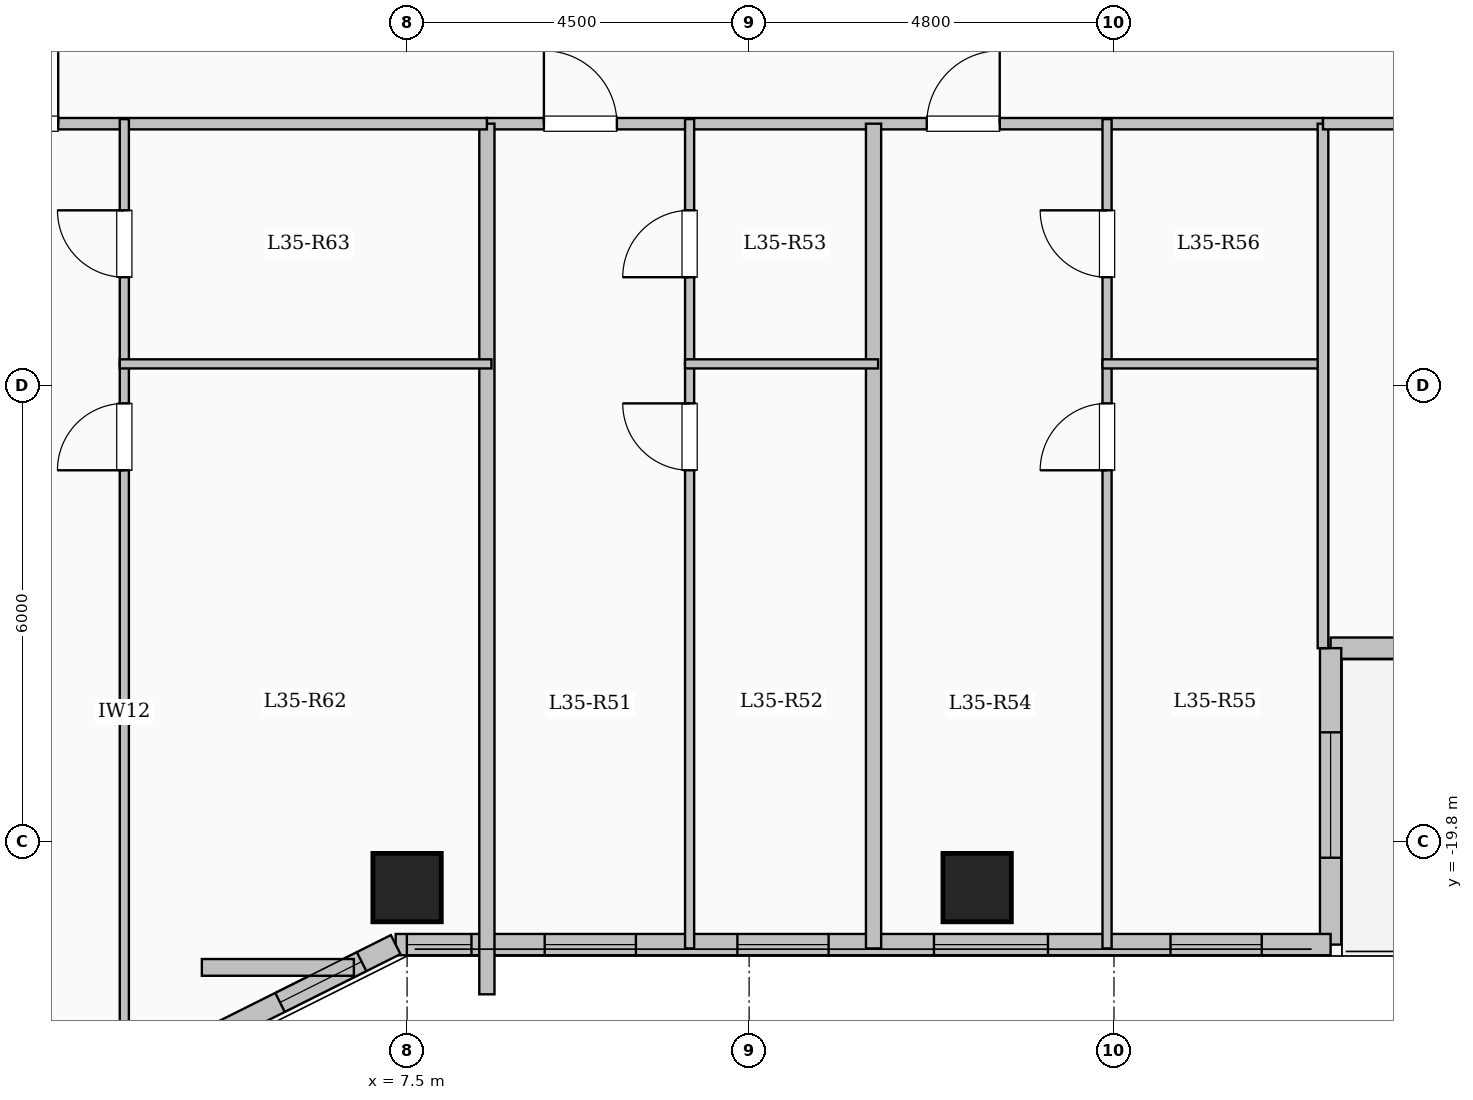
"""IFC4 building model, lengths in metres.
Left out: names, types, materials, properties, quantities, classifications, styles, units other than length and angle.
Written with IfcOpenShell. Run it as: python <this file> out.ifc"""

import sys

from ifc_helpers import new_model, si_unit, direction, frame, frame_2d, origin, origin_2d, place, context, subcontext, project, spatial, rectangle, extrude, element, fill, save


model = new_model("IFC4")
c1 = context("Model", 3, precision=1e-05, world=origin(), true_north=direction((0.0, 1.0)))
c2 = subcontext(c1, "Body", "Model", "MODEL_VIEW")
j1 = project(units=[si_unit("LENGTHUNIT", "METRE"), si_unit("PLANEANGLEUNIT", "RADIAN")], contexts=[c1])
p1 = place(None, origin())
s1 = spatial("IfcSite", under=j1, at=p1, CompositionType="ELEMENT")
p2 = place(p1, origin())
s2 = spatial("IfcBuilding", under=s1, at=p2, CompositionType="ELEMENT")
p3 = place(p2, frame((0.0, 0.0, 132.6)))
s3 = spatial("IfcBuildingStorey", under=s2, at=p3, CompositionType="ELEMENT", Elevation=132.6)
for number, where, z_axis, x_axis in (
    (1, (7.5, -20.4, 0.0), (0.0, 0.0, 1.0), (1.0, 0.0, 0.0)),
    (2, (15.0, -20.4, 0.0), (0.0, 0.0, 1.0), (1.0, 0.0, 0.0)),
):
    element("IfcColumn", number, at=place(p3, frame(where, z_axis=z_axis, x_axis=x_axis)), inside=s3, PredefinedType="COLUMN", context=c2, shape_type="SweptSolid", body=[
        extrude(rectangle(XDim=0.9, YDim=0.9, at=origin_2d()), origin(), (0.0, 0.0, 1.0), 3.35),
    ])
p4 = place(p3, frame((25.05, -17.25, 0.0), z_axis=(0.0, 0.0, 1.0), x_axis=(-1.0, 0.0, 0.0)))
e3 = element("IfcWall", 3, at=p4, inside=s3, PredefinedType="SOLIDWALL", context=c2, shape_type="SweptSolid", body=[
    extrude(rectangle(XDim=5.4, YDim=0.28, at=frame_2d((2.7, 0.0))), origin(), (0.0, 0.0, 1.0), 3.1),
])
p5 = place(p4, frame((2.25, 0.0, 0.0)))
e4 = element("IfcOpeningElement", 4, at=p5, cuts=e3, PredefinedType="OPENING", context=c2, shape_type="SweptSolid", body=[
    extrude(rectangle(XDim=1.1, YDim=2.2, at=frame_2d((0.55, 1.1))), frame((0.0, 0.15, 0.0), z_axis=(0.0, -1.0, 0.0), x_axis=(1.0, 0.0, 0.0)), (0.0, 0.0, 1.0), 0.3),
])
p6 = place(p4, frame((0.63, 0.0, 0.95)))
e5 = element("IfcOpeningElement", 5, at=p6, cuts=e3, PredefinedType="OPENING", context=c2, shape_type="SweptSolid", body=[
    extrude(rectangle(XDim=1.2, YDim=1.5, at=frame_2d((0.6, 0.75))), frame((0.0, 0.15, 0.0), z_axis=(0.0, -1.0, 0.0), x_axis=(1.0, 0.0, 0.0)), (0.0, 0.0, 1.0), 0.3),
])
p7 = place(p3, frame((19.65, -17.25, 0.0), z_axis=(0.0, 0.0, 1.0), x_axis=(0.0, -1.0, 0.0)))
e6 = element("IfcWall", 6, at=p7, inside=s3, PredefinedType="SOLIDWALL", context=c2, shape_type="SweptSolid", body=[
    extrude(rectangle(XDim=3.9, YDim=0.28, at=frame_2d((1.95, 0.0))), origin(), (0.0, 0.0, 1.0), 3.1),
])
p8 = place(p7, frame((1.107, 0.0, 0.9)))
e7 = element("IfcOpeningElement", 7, at=p8, cuts=e6, PredefinedType="OPENING", context=c2, shape_type="SweptSolid", body=[
    extrude(rectangle(XDim=1.65, YDim=1.6, at=frame_2d((0.825, 0.8))), frame((0.0, 0.15, 0.0), z_axis=(0.0, -1.0, 0.0), x_axis=(1.0, 0.0, 0.0)), (0.0, 0.0, 1.0), 0.3),
])
p9 = place(p3, frame((19.65, -21.15, 0.0), z_axis=(0.0, 0.0, 1.0), x_axis=(-1.0, 0.0, 0.0)))
e8 = element("IfcWall", 8, at=p9, inside=s3, PredefinedType="SOLIDWALL", context=c2, shape_type="SweptSolid", body=[
    extrude(rectangle(XDim=12.3, YDim=0.28, at=frame_2d((6.15, 0.0))), origin(), (0.0, 0.0, 1.0), 3.1),
])
p10 = place(p9, frame((0.906, 0.0, 0.95)))
e9 = element("IfcOpeningElement", 9, at=p10, cuts=e8, PredefinedType="OPENING", context=c2, shape_type="SweptSolid", body=[
    extrude(rectangle(XDim=1.2, YDim=1.5, at=frame_2d((0.6, 0.75))), frame((0.0, 0.15, 0.0), z_axis=(0.0, -1.0, 0.0), x_axis=(1.0, 0.0, 0.0)), (0.0, 0.0, 1.0), 0.3),
])
p11 = place(p9, frame((3.718, 0.0, 0.9)))
e10 = element("IfcOpeningElement", 10, at=p11, cuts=e8, PredefinedType="OPENING", context=c2, shape_type="SweptSolid", body=[
    extrude(rectangle(XDim=1.5, YDim=1.65, at=frame_2d((0.75, 0.825))), frame((0.0, 0.15, 0.0), z_axis=(0.0, -1.0, 0.0), x_axis=(1.0, 0.0, 0.0)), (0.0, 0.0, 1.0), 0.3),
])
p12 = place(p9, frame((6.604, 0.0, 0.95)))
e11 = element("IfcOpeningElement", 11, at=p12, cuts=e8, PredefinedType="OPENING", context=c2, shape_type="SweptSolid", body=[
    extrude(rectangle(XDim=1.2, YDim=1.5, at=frame_2d((0.6, 0.75))), frame((0.0, 0.15, 0.0), z_axis=(0.0, -1.0, 0.0), x_axis=(1.0, 0.0, 0.0)), (0.0, 0.0, 1.0), 0.3),
])
p13 = place(p9, frame((9.14, 0.0, 0.95)))
e12 = element("IfcOpeningElement", 12, at=p13, cuts=e8, PredefinedType="OPENING", context=c2, shape_type="SweptSolid", body=[
    extrude(rectangle(XDim=1.2, YDim=1.5, at=frame_2d((0.6, 0.75))), frame((0.0, 0.15, 0.0), z_axis=(0.0, -1.0, 0.0), x_axis=(1.0, 0.0, 0.0)), (0.0, 0.0, 1.0), 0.3),
])
p14 = place(p9, frame((11.303, 0.0, 0.95)))
e13 = element("IfcOpeningElement", 13, at=p14, cuts=e8, PredefinedType="OPENING", context=c2, shape_type="SweptSolid", body=[
    extrude(rectangle(XDim=0.85, YDim=1.5, at=frame_2d((0.425, 0.75))), frame((0.0, 0.15, 0.0), z_axis=(0.0, -1.0, 0.0), x_axis=(1.0, 0.0, 0.0)), (0.0, 0.0, 1.0), 0.3),
])
p15 = place(p3, frame((7.35, -21.15, 0.0), z_axis=(0.0, 0.0, 1.0), x_axis=(-0.894427191, -0.4472135955, 0.0)))
e14 = element("IfcWall", 14, at=p15, inside=s3, PredefinedType="SOLIDWALL", context=c2, shape_type="SweptSolid", body=[
    extrude(rectangle(XDim=3.354, YDim=0.28, at=frame_2d((1.677, 0.0))), origin(), (0.0, 0.0, 1.0), 3.1),
])
p16 = place(p15, frame((0.501, 0.0, 0.95)))
e15 = element("IfcOpeningElement", 15, at=p16, cuts=e14, PredefinedType="OPENING", context=c2, shape_type="SweptSolid", body=[
    extrude(rectangle(XDim=1.2, YDim=1.5, at=frame_2d((0.6, 0.75))), frame((0.0, 0.15, 0.0), z_axis=(0.0, -1.0, 0.0), x_axis=(1.0, 0.0, 0.0)), (0.0, 0.0, 1.0), 0.3),
])
p17 = place(p3, frame((4.8, -21.45, 0.0), z_axis=(0.0, 0.0, 1.0), x_axis=(1.0, 0.0, 0.0)))
e16 = element("IfcWall", 16, at=p17, inside=s3, PredefinedType="PARAPET", context=c2, shape_type="SweptSolid", body=[
    extrude(rectangle(XDim=2.0, YDim=0.22, at=frame_2d((1.0, 0.0))), origin(), (0.0, 0.0, 1.0), 0.85),
])
p18 = place(p3, frame((8.55, -10.35, 0.0), z_axis=(0.0, 0.0, 1.0), x_axis=(1.0, 0.0, 0.0)))
e17 = element("IfcWall", 17, at=p18, inside=s3, PredefinedType="PARTITIONING", context=c2, shape_type="SweptSolid", body=[
    extrude(rectangle(XDim=11.0, YDim=0.15, at=frame_2d((5.5, 0.0))), origin(), (0.0, 0.0, 1.0), 3.1),
])
p19 = place(p18, frame((0.75, 0.0, 0.0)))
e18 = element("IfcOpeningElement", 18, at=p19, cuts=e17, PredefinedType="OPENING", context=c2, shape_type="SweptSolid", body=[
    extrude(rectangle(XDim=0.96, YDim=2.15, at=frame_2d((0.48, 1.075))), frame((0.0, 0.085, 0.0), z_axis=(0.0, -1.0, 0.0), x_axis=(1.0, 0.0, 0.0)), (0.0, 0.0, 1.0), 0.17),
])
p20 = place(p18, frame((5.787, 0.0, 0.0)))
e19 = element("IfcOpeningElement", 19, at=p20, cuts=e17, PredefinedType="OPENING", context=c2, shape_type="SweptSolid", body=[
    extrude(rectangle(XDim=0.96, YDim=2.15, at=frame_2d((0.48, 1.075))), frame((0.0, 0.085, 0.0), z_axis=(0.0, -1.0, 0.0), x_axis=(1.0, 0.0, 0.0)), (0.0, 0.0, 1.0), 0.17),
])
p21 = place(p3, frame((13.637, -21.2, 0.0), z_axis=(0.0, 0.0, 1.0), x_axis=(0.0, 1.0, 0.0)))
e20 = element("IfcWall", 20, at=p21, inside=s3, PredefinedType="SOLIDWALL", context=c2, shape_type="SweptSolid", body=[
    extrude(rectangle(XDim=10.85, YDim=0.2, at=frame_2d((5.425, 0.0))), origin(), (0.0, 0.0, 1.0), 3.1),
])
p22 = place(p3, frame((11.217, -21.2, 0.0), z_axis=(0.0, 0.0, 1.0), x_axis=(0.0, 1.0, 0.0)))
e21 = element("IfcWall", 21, at=p22, inside=s3, PredefinedType="PARTITIONING", context=c2, shape_type="SweptSolid", body=[
    extrude(rectangle(XDim=7.69, YDim=0.12, at=frame_2d((3.845, 0.0))), origin(), (0.0, 0.0, 1.0), 3.1),
])
p23 = place(p22, frame((6.29, 0.0, 0.0)))
e22 = element("IfcOpeningElement", 22, at=p23, cuts=e21, PredefinedType="OPENING", context=c2, shape_type="SweptSolid", body=[
    extrude(rectangle(XDim=0.88, YDim=2.1, at=frame_2d((0.44, 1.05))), frame((0.0, 0.07, 0.0), z_axis=(0.0, -1.0, 0.0), x_axis=(1.0, 0.0, 0.0)), (0.0, 0.0, 1.0), 0.14),
])
p24 = place(p3, frame((11.217, -13.51, 0.0), z_axis=(0.0, 0.0, 1.0), x_axis=(0.0, 1.0, 0.0)))
e23 = element("IfcWall", 23, at=p24, inside=s3, PredefinedType="PARTITIONING", context=c2, shape_type="SweptSolid", body=[
    extrude(rectangle(XDim=3.22, YDim=0.12, at=frame_2d((1.61, 0.0))), origin(), (0.0, 0.0, 1.0), 3.1),
])
p25 = place(p24, frame((1.14, 0.0, 0.0)))
e24 = element("IfcOpeningElement", 24, at=p25, cuts=e23, PredefinedType="OPENING", context=c2, shape_type="SweptSolid", body=[
    extrude(rectangle(XDim=0.88, YDim=2.1, at=frame_2d((0.44, 1.05))), frame((0.0, 0.07, 0.0), z_axis=(0.0, -1.0, 0.0), x_axis=(1.0, 0.0, 0.0)), (0.0, 0.0, 1.0), 0.14),
])
p26 = place(p3, frame((11.157, -13.51, 0.0), z_axis=(0.0, 0.0, 1.0), x_axis=(1.0, 0.0, 0.0)))
e25 = element("IfcWall", 25, at=p26, inside=s3, PredefinedType="PARTITIONING", context=c2, shape_type="SweptSolid", body=[
    extrude(rectangle(XDim=2.54, YDim=0.12, at=frame_2d((1.27, 0.0))), origin(), (0.0, 0.0, 1.0), 3.1),
])
p27 = place(p3, frame((16.709, -21.2, 0.0), z_axis=(0.0, 0.0, 1.0), x_axis=(0.0, 1.0, 0.0)))
e26 = element("IfcWall", 26, at=p27, inside=s3, PredefinedType="PARTITIONING", context=c2, shape_type="SweptSolid", body=[
    extrude(rectangle(XDim=7.69, YDim=0.12, at=frame_2d((3.845, 0.0))), origin(), (0.0, 0.0, 1.0), 3.1),
])
p28 = place(p27, frame((6.29, 0.0, 0.0)))
e27 = element("IfcOpeningElement", 27, at=p28, cuts=e26, PredefinedType="OPENING", context=c2, shape_type="SweptSolid", body=[
    extrude(rectangle(XDim=0.88, YDim=2.1, at=frame_2d((0.44, 1.05))), frame((0.0, 0.07, 0.0), z_axis=(0.0, -1.0, 0.0), x_axis=(1.0, 0.0, 0.0)), (0.0, 0.0, 1.0), 0.14),
])
p29 = place(p3, frame((16.709, -13.51, 0.0), z_axis=(0.0, 0.0, 1.0), x_axis=(0.0, 1.0, 0.0)))
e28 = element("IfcWall", 28, at=p29, inside=s3, PredefinedType="PARTITIONING", context=c2, shape_type="SweptSolid", body=[
    extrude(rectangle(XDim=3.22, YDim=0.12, at=frame_2d((1.61, 0.0))), origin(), (0.0, 0.0, 1.0), 3.1),
])
p30 = place(p29, frame((1.14, 0.0, 0.0)))
e29 = element("IfcOpeningElement", 29, at=p30, cuts=e28, PredefinedType="OPENING", context=c2, shape_type="SweptSolid", body=[
    extrude(rectangle(XDim=0.88, YDim=2.1, at=frame_2d((0.44, 1.05))), frame((0.0, 0.07, 0.0), z_axis=(0.0, -1.0, 0.0), x_axis=(1.0, 0.0, 0.0)), (0.0, 0.0, 1.0), 0.14),
])
p31 = place(p3, frame((16.649, -13.51, 0.0), z_axis=(0.0, 0.0, 1.0), x_axis=(1.0, 0.0, 0.0)))
e30 = element("IfcWall", 30, at=p31, inside=s3, PredefinedType="PARTITIONING", context=c2, shape_type="SweptSolid", body=[
    extrude(rectangle(XDim=2.961, YDim=0.12, at=frame_2d((1.48, 0.0))), origin(), (0.0, 0.0, 1.0), 3.1),
])
p32 = place(p3, frame((8.55, -21.804, 0.0), z_axis=(0.0, 0.0, 1.0), x_axis=(0.0, 1.0, 0.0)))
e31 = element("IfcWall", 31, at=p32, inside=s3, PredefinedType="SOLIDWALL", context=c2, shape_type="SweptSolid", body=[
    extrude(rectangle(XDim=11.454, YDim=0.2, at=frame_2d((5.727, 0.0))), origin(), (0.0, 0.0, 1.0), 3.1),
])
p33 = place(p3, frame((-8.55, -10.35, 0.0), z_axis=(0.0, 0.0, 1.0), x_axis=(1.0, 0.0, 0.0)))
e32 = element("IfcWall", 32, at=p33, inside=s3, PredefinedType="PARTITIONING", context=c2, shape_type="SweptSolid", body=[
    extrude(rectangle(XDim=17.1, YDim=0.15, at=frame_2d((8.55, 0.0))), origin(), (0.0, 0.0, 1.0), 3.1),
])
p34 = place(p33, frame((1.15, 0.0, 0.0)))
e33 = element("IfcOpeningElement", 33, at=p34, cuts=e32, PredefinedType="OPENING", context=c2, shape_type="SweptSolid", body=[
    extrude(rectangle(XDim=0.96, YDim=2.15, at=frame_2d((0.48, 1.075))), frame((0.0, 0.085, 0.0), z_axis=(0.0, -1.0, 0.0), x_axis=(1.0, 0.0, 0.0)), (0.0, 0.0, 1.0), 0.17),
])
p35 = place(p33, frame((10.5, 0.0, 0.0)))
e34 = element("IfcOpeningElement", 34, at=p35, cuts=e32, PredefinedType="OPENING", context=c2, shape_type="SweptSolid", body=[
    extrude(rectangle(XDim=0.96, YDim=2.15, at=frame_2d((0.48, 1.075))), frame((0.0, 0.085, 0.0), z_axis=(0.0, -1.0, 0.0), x_axis=(1.0, 0.0, 0.0)), (0.0, 0.0, 1.0), 0.17),
])
p36 = place(p3, frame((3.78, -22.68, 0.0), z_axis=(0.0, 0.0, 1.0), x_axis=(0.0, 1.0, 0.0)))
e35 = element("IfcWall", 35, at=p36, inside=s3, PredefinedType="PARTITIONING", context=c2, shape_type="SweptSolid", body=[
    extrude(rectangle(XDim=9.17, YDim=0.12, at=frame_2d((4.585, 0.0))), origin(), (0.0, 0.0, 1.0), 3.1),
])
p37 = place(p36, frame((7.77, 0.0, 0.0)))
e36 = element("IfcOpeningElement", 36, at=p37, cuts=e35, PredefinedType="OPENING", context=c2, shape_type="SweptSolid", body=[
    extrude(rectangle(XDim=0.88, YDim=2.1, at=frame_2d((0.44, 1.05))), frame((0.0, 0.07, 0.0), z_axis=(0.0, -1.0, 0.0), x_axis=(1.0, 0.0, 0.0)), (0.0, 0.0, 1.0), 0.14),
])
p38 = place(p3, frame((3.78, -13.51, 0.0), z_axis=(0.0, 0.0, 1.0), x_axis=(0.0, 1.0, 0.0)))
e37 = element("IfcWall", 37, at=p38, inside=s3, PredefinedType="PARTITIONING", context=c2, shape_type="SweptSolid", body=[
    extrude(rectangle(XDim=3.22, YDim=0.12, at=frame_2d((1.61, 0.0))), origin(), (0.0, 0.0, 1.0), 3.1),
])
p39 = place(p38, frame((1.14, 0.0, 0.0)))
e38 = element("IfcOpeningElement", 38, at=p39, cuts=e37, PredefinedType="OPENING", context=c2, shape_type="SweptSolid", body=[
    extrude(rectangle(XDim=0.88, YDim=2.1, at=frame_2d((0.44, 1.05))), frame((0.0, 0.07, 0.0), z_axis=(0.0, -1.0, 0.0), x_axis=(1.0, 0.0, 0.0)), (0.0, 0.0, 1.0), 0.14),
])
p40 = place(p3, frame((3.72, -13.51, 0.0), z_axis=(0.0, 0.0, 1.0), x_axis=(1.0, 0.0, 0.0)))
e39 = element("IfcWall", 39, at=p40, inside=s3, PredefinedType="PARTITIONING", context=c2, shape_type="SweptSolid", body=[
    extrude(rectangle(XDim=4.89, YDim=0.12, at=frame_2d((2.445, 0.0))), origin(), (0.0, 0.0, 1.0), 3.1),
])
p41 = place(p3, frame((19.55, -17.25, 0.0), z_axis=(0.0, 0.0, 1.0), x_axis=(0.0, 1.0, 0.0)))
e40 = element("IfcWall", 40, at=p41, inside=s3, PredefinedType="PARTITIONING", context=c2, shape_type="SweptSolid", body=[
    extrude(rectangle(XDim=6.9, YDim=0.14, at=frame_2d((3.45, 0.0))), origin(), (0.0, 0.0, 1.0), 3.1),
])
p42 = place(p3, frame((19.55, -10.35, 0.0), z_axis=(0.0, 0.0, 1.0), x_axis=(1.0, 0.0, 0.0)))
e41 = element("IfcWall", 41, at=p42, inside=s3, PredefinedType="PARTITIONING", context=c2, shape_type="SweptSolid", body=[
    extrude(rectangle(XDim=5.53, YDim=0.15, at=frame_2d((2.765, 0.0))), origin(), (0.0, 0.0, 1.0), 3.1),
])
p43 = place(p42, frame((2.29, 0.0, 0.0)))
e42 = element("IfcOpeningElement", 42, at=p43, cuts=e41, PredefinedType="OPENING", context=c2, shape_type="SweptSolid", body=[
    extrude(rectangle(XDim=0.95, YDim=2.15, at=frame_2d((0.475, 1.075))), frame((0.0, 0.085, 0.0), z_axis=(0.0, -1.0, 0.0), x_axis=(1.0, 0.0, 0.0)), (0.0, 0.0, 1.0), 0.17),
])
p44 = place(p8, origin())
e43 = element("IfcWindow", 43, at=p44, inside=s3, PartitioningType="SINGLE_PANEL", PredefinedType="WINDOW", context=c2, shape_type="SweptSolid", body=[
    extrude(rectangle(XDim=1.65, YDim=1.6, at=frame_2d((0.825, 0.8))), frame((0.0, 0.03, 0.0), z_axis=(0.0, -1.0, 0.0), x_axis=(1.0, 0.0, 0.0)), (0.0, 0.0, 1.0), 0.06),
])
fill(e7, e43)
p45 = place(p10, origin())
e44 = element("IfcWindow", 44, at=p45, inside=s3, PartitioningType="SINGLE_PANEL", PredefinedType="WINDOW", context=c2, shape_type="SweptSolid", body=[
    extrude(rectangle(XDim=1.2, YDim=1.5, at=frame_2d((0.6, 0.75))), frame((0.0, 0.03, 0.0), z_axis=(0.0, -1.0, 0.0), x_axis=(1.0, 0.0, 0.0)), (0.0, 0.0, 1.0), 0.06),
])
fill(e9, e44)
p46 = place(p11, origin())
e45 = element("IfcWindow", 45, at=p46, inside=s3, PartitioningType="SINGLE_PANEL", PredefinedType="WINDOW", context=c2, shape_type="SweptSolid", body=[
    extrude(rectangle(XDim=1.5, YDim=1.65, at=frame_2d((0.75, 0.825))), frame((0.0, 0.03, 0.0), z_axis=(0.0, -1.0, 0.0), x_axis=(1.0, 0.0, 0.0)), (0.0, 0.0, 1.0), 0.06),
])
fill(e10, e45)
p47 = place(p12, origin())
e46 = element("IfcWindow", 46, at=p47, inside=s3, PartitioningType="SINGLE_PANEL", PredefinedType="WINDOW", context=c2, shape_type="SweptSolid", body=[
    extrude(rectangle(XDim=1.2, YDim=1.5, at=frame_2d((0.6, 0.75))), frame((0.0, 0.03, 0.0), z_axis=(0.0, -1.0, 0.0), x_axis=(1.0, 0.0, 0.0)), (0.0, 0.0, 1.0), 0.06),
])
fill(e11, e46)
p48 = place(p13, origin())
e47 = element("IfcWindow", 47, at=p48, inside=s3, PartitioningType="SINGLE_PANEL", PredefinedType="WINDOW", context=c2, shape_type="SweptSolid", body=[
    extrude(rectangle(XDim=1.2, YDim=1.5, at=frame_2d((0.6, 0.75))), frame((0.0, 0.03, 0.0), z_axis=(0.0, -1.0, 0.0), x_axis=(1.0, 0.0, 0.0)), (0.0, 0.0, 1.0), 0.06),
])
fill(e12, e47)
p49 = place(p14, origin())
e48 = element("IfcWindow", 48, at=p49, inside=s3, PartitioningType="SINGLE_PANEL", PredefinedType="WINDOW", context=c2, shape_type="SweptSolid", body=[
    extrude(rectangle(XDim=0.85, YDim=1.5, at=frame_2d((0.425, 0.75))), frame((0.0, 0.03, 0.0), z_axis=(0.0, -1.0, 0.0), x_axis=(1.0, 0.0, 0.0)), (0.0, 0.0, 1.0), 0.06),
])
fill(e13, e48)
p50 = place(p16, origin())
e49 = element("IfcWindow", 49, at=p50, inside=s3, PartitioningType="SINGLE_PANEL", PredefinedType="WINDOW", context=c2, shape_type="SweptSolid", body=[
    extrude(rectangle(XDim=1.2, YDim=1.5, at=frame_2d((0.6, 0.75))), frame((0.0, 0.03, 0.0), z_axis=(0.0, -1.0, 0.0), x_axis=(1.0, 0.0, 0.0)), (0.0, 0.0, 1.0), 0.06),
])
fill(e15, e49)
p51 = place(p19, origin())
e50 = element("IfcDoor", 50, at=p51, inside=s3, OperationType="SINGLE_SWING_LEFT", PredefinedType="DOOR", context=c2, shape_type="SweptSolid", body=[
    extrude(rectangle(XDim=0.96, YDim=2.15, at=frame_2d((0.48, 1.075))), frame((0.0, 0.025, 0.0), z_axis=(0.0, -1.0, 0.0), x_axis=(1.0, 0.0, 0.0)), (0.0, 0.0, 1.0), 0.05),
])
fill(e18, e50)
p52 = place(p23, origin())
e51 = element("IfcDoor", 51, at=p52, inside=s3, OperationType="SINGLE_SWING_RIGHT", PredefinedType="DOOR", context=c2, shape_type="SweptSolid", body=[
    extrude(rectangle(XDim=0.88, YDim=2.1, at=frame_2d((0.44, 1.05))), frame((0.0, 0.025, 0.0), z_axis=(0.0, -1.0, 0.0), x_axis=(1.0, 0.0, 0.0)), (0.0, 0.0, 1.0), 0.05),
])
fill(e22, e51)
p53 = place(p25, origin())
e52 = element("IfcDoor", 52, at=p53, inside=s3, OperationType="SINGLE_SWING_LEFT", PredefinedType="DOOR", context=c2, shape_type="SweptSolid", body=[
    extrude(rectangle(XDim=0.88, YDim=2.1, at=frame_2d((0.44, 1.05))), frame((0.0, 0.025, 0.0), z_axis=(0.0, -1.0, 0.0), x_axis=(1.0, 0.0, 0.0)), (0.0, 0.0, 1.0), 0.05),
])
fill(e24, e52)
p54 = place(p20, origin())
e53 = element("IfcDoor", 53, at=p54, inside=s3, OperationType="SINGLE_SWING_RIGHT", PredefinedType="DOOR", context=c2, shape_type="SweptSolid", body=[
    extrude(rectangle(XDim=0.96, YDim=2.15, at=frame_2d((0.48, 1.075))), frame((0.0, 0.025, 0.0), z_axis=(0.0, -1.0, 0.0), x_axis=(1.0, 0.0, 0.0)), (0.0, 0.0, 1.0), 0.05),
])
fill(e19, e53)
p55 = place(p28, origin())
e54 = element("IfcDoor", 54, at=p55, inside=s3, OperationType="SINGLE_SWING_LEFT", PredefinedType="DOOR", context=c2, shape_type="SweptSolid", body=[
    extrude(rectangle(XDim=0.88, YDim=2.1, at=frame_2d((0.44, 1.05))), frame((0.0, 0.025, 0.0), z_axis=(0.0, -1.0, 0.0), x_axis=(1.0, 0.0, 0.0)), (0.0, 0.0, 1.0), 0.05),
])
fill(e27, e54)
p56 = place(p30, origin())
e55 = element("IfcDoor", 55, at=p56, inside=s3, OperationType="SINGLE_SWING_RIGHT", PredefinedType="DOOR", context=c2, shape_type="SweptSolid", body=[
    extrude(rectangle(XDim=0.88, YDim=2.1, at=frame_2d((0.44, 1.05))), frame((0.0, 0.025, 0.0), z_axis=(0.0, -1.0, 0.0), x_axis=(1.0, 0.0, 0.0)), (0.0, 0.0, 1.0), 0.05),
])
fill(e29, e55)
p57 = place(p35, origin())
e56 = element("IfcDoor", 56, at=p57, inside=s3, OperationType="SINGLE_SWING_RIGHT", PredefinedType="DOOR", context=c2, shape_type="SweptSolid", body=[
    extrude(rectangle(XDim=0.96, YDim=2.15, at=frame_2d((0.48, 1.075))), frame((0.0, 0.025, 0.0), z_axis=(0.0, -1.0, 0.0), x_axis=(1.0, 0.0, 0.0)), (0.0, 0.0, 1.0), 0.05),
])
fill(e34, e56)
p58 = place(p37, origin())
e57 = element("IfcDoor", 57, at=p58, inside=s3, OperationType="SINGLE_SWING_LEFT", PredefinedType="DOOR", context=c2, shape_type="SweptSolid", body=[
    extrude(rectangle(XDim=0.88, YDim=2.1, at=frame_2d((0.44, 1.05))), frame((0.0, 0.025, 0.0), z_axis=(0.0, -1.0, 0.0), x_axis=(1.0, 0.0, 0.0)), (0.0, 0.0, 1.0), 0.05),
])
fill(e36, e57)
p59 = place(p39, origin())
e58 = element("IfcDoor", 58, at=p59, inside=s3, OperationType="SINGLE_SWING_RIGHT", PredefinedType="DOOR", context=c2, shape_type="SweptSolid", body=[
    extrude(rectangle(XDim=0.88, YDim=2.1, at=frame_2d((0.44, 1.05))), frame((0.0, 0.025, 0.0), z_axis=(0.0, -1.0, 0.0), x_axis=(1.0, 0.0, 0.0)), (0.0, 0.0, 1.0), 0.05),
])
fill(e38, e58)
save(model, sys.argv[1])
